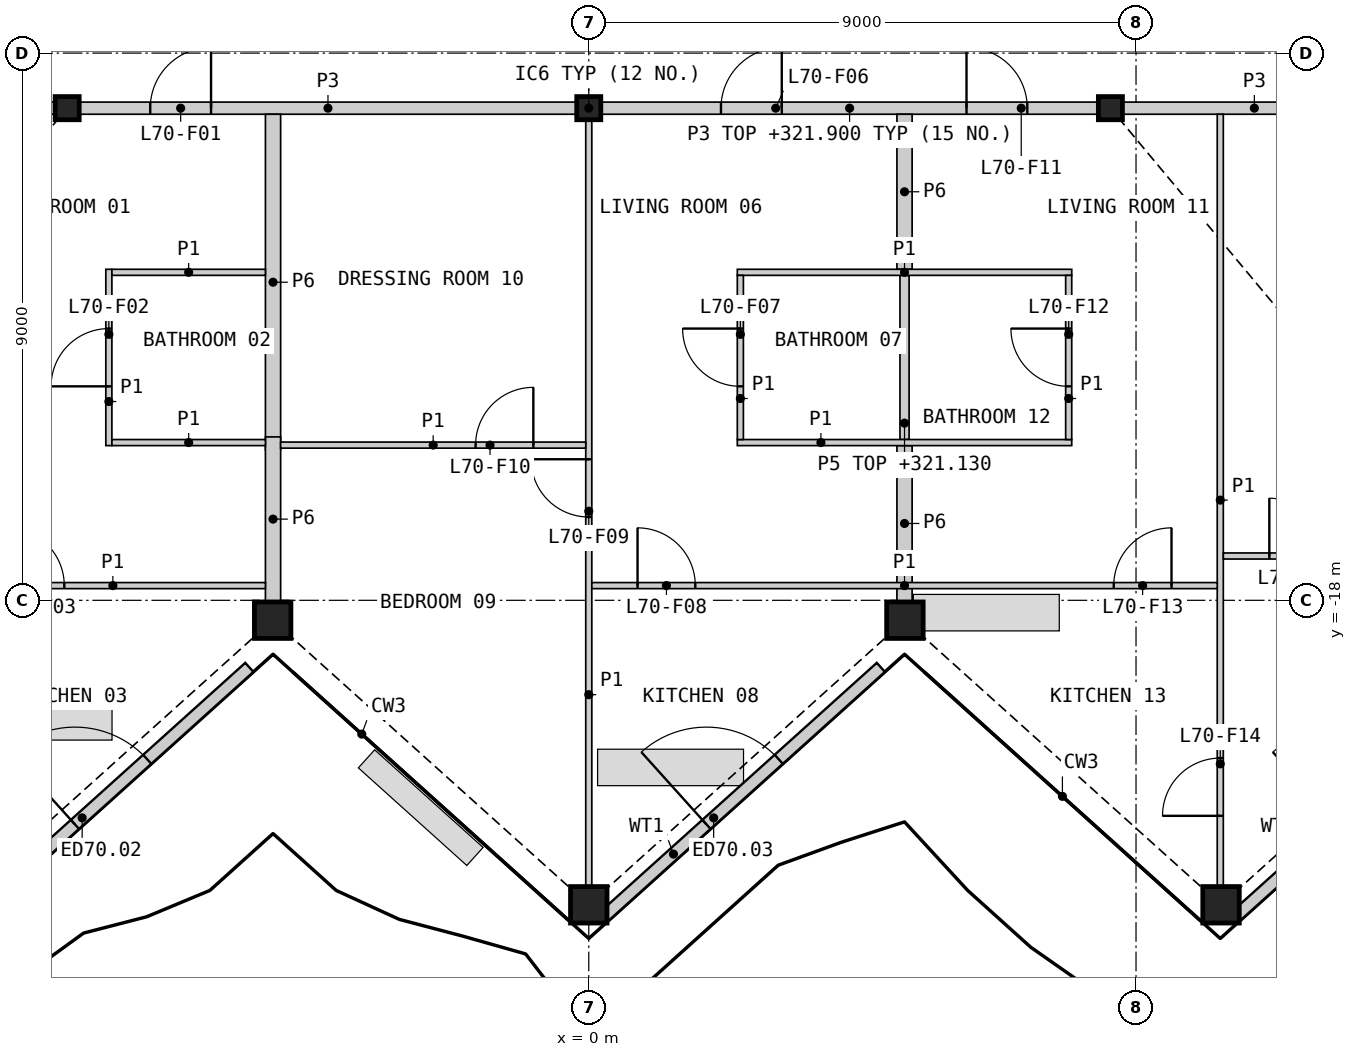
"""IFC4 building model, lengths in metres.
Left out: names, types, materials, properties, quantities, classifications, styles, units other than length and angle.
Written with IfcOpenShell. Run it as: python <this file> out.ifc"""

import sys

from ifc_helpers import new_model, si_unit, direction, frame, frame_2d, origin, origin_2d, place, context, subcontext, project, spatial, rectangle, hollow_rectangle, i_section, extrude, element, fill, save


model = new_model("IFC4")
c1 = context("Model", 3, precision=1e-05, world=origin(), true_north=direction((0.0, 1.0)))
c2 = subcontext(c1, "Body", "Model", "MODEL_VIEW")
j1 = project(units=[si_unit("LENGTHUNIT", "METRE"), si_unit("PLANEANGLEUNIT", "RADIAN")], contexts=[c1])
p1 = place(None, origin())
s1 = spatial("IfcSite", under=j1, at=p1, CompositionType="ELEMENT")
p2 = place(p1, origin())
s2 = spatial("IfcBuilding", under=s1, at=p2, CompositionType="ELEMENT")
p3 = place(p2, frame((0.0, 0.0, 318.8)))
s3 = spatial("IfcBuildingStorey", under=s2, at=p3, CompositionType="ELEMENT", Elevation=318.8)
for number, where, z_axis, x_axis in (
    (1, (-5.199, -18.327, 0.0), (0.0, 0.0, 1.0), (1.0, 0.0, 0.0)),
    (2, (0.0, -23.008, 0.0), (0.0, 0.0, 1.0), (1.0, 0.0, 0.0)),
    (3, (5.199, -18.327, 0.0), (0.0, 0.0, 1.0), (1.0, 0.0, 0.0)),
    (4, (10.398, -23.008, 0.0), (0.0, 0.0, 1.0), (1.0, 0.0, 0.0)),
):
    element("IfcColumn", number, at=place(p3, frame(where, z_axis=z_axis, x_axis=x_axis)), inside=s3, PredefinedType="COLUMN", context=c2, shape_type="SweptSolid", body=[
        extrude(hollow_rectangle(XDim=0.6, YDim=0.6, WallThickness=0.04, at=origin_2d()), origin(), (0.0, 0.0, 1.0), 3.4),
    ])
for number, where, z_axis, x_axis in (
    (5, (-8.578, -9.906, 0.0), (0.0, 0.0, 1.0), (1.0, 0.0, 0.0)),
    (6, (0.0, -9.906, 0.0), (0.0, 0.0, 1.0), (1.0, 0.0, 0.0)),
    (7, (8.578, -9.906, 0.0), (0.0, 0.0, 1.0), (1.0, 0.0, 0.0)),
):
    element("IfcColumn", number, at=place(p3, frame(where, z_axis=z_axis, x_axis=x_axis)), inside=s3, PredefinedType="COLUMN", context=c2, shape_type="SweptSolid", body=[
        extrude(i_section(OverallWidth=0.396, OverallDepth=0.381, WebThickness=0.019, FlangeThickness=0.03, at=origin_2d()), origin(), (0.0, 0.0, 1.0), 3.4),
    ])
p4 = place(p3, frame((-10.13, -23.198, 0.0), z_axis=(0.0, 0.0, 1.0), x_axis=(0.743139400616, 0.669136631229, 0.0)))
e8 = element("IfcWall", 8, at=p4, inside=s3, PredefinedType="SOLIDWALL", context=c2, shape_type="SweptSolid", body=[
    extrude(rectangle(XDim=6.12, YDim=0.2, at=frame_2d((3.06, 0.0))), origin(), (0.0, 0.0, 1.0), 2.488),
])
p5 = place(p4, frame((2.26, 0.0, 0.0)))
e9 = element("IfcOpeningElement", 9, at=p5, cuts=e8, PredefinedType="OPENING", context=c2, shape_type="SweptSolid", body=[
    extrude(rectangle(XDim=1.6, YDim=2.25, at=frame_2d((0.8, 1.125))), frame((0.0, 0.11, 0.0), z_axis=(0.0, -1.0, 0.0), x_axis=(1.0, 0.0, 0.0)), (0.0, 0.0, 1.0), 0.22),
])
p6 = place(p3, frame((0.256, -23.198, 0.0), z_axis=(0.0, 0.0, 1.0), x_axis=(0.743139400616, 0.669136631229, 0.0)))
e10 = element("IfcWall", 10, at=p6, inside=s3, PredefinedType="SOLIDWALL", context=c2, shape_type="SweptSolid", body=[
    extrude(rectangle(XDim=6.12, YDim=0.2, at=frame_2d((3.06, 0.0))), origin(), (0.0, 0.0, 1.0), 2.488),
])
p7 = place(p6, frame((2.26, 0.0, 0.0)))
e11 = element("IfcOpeningElement", 11, at=p7, cuts=e10, PredefinedType="OPENING", context=c2, shape_type="SweptSolid", body=[
    extrude(rectangle(XDim=1.6, YDim=2.25, at=frame_2d((0.8, 1.125))), frame((0.0, 0.11, 0.0), z_axis=(0.0, -1.0, 0.0), x_axis=(1.0, 0.0, 0.0)), (0.0, 0.0, 1.0), 0.22),
])
p8 = place(p3, frame((10.641, -23.198, 0.0), z_axis=(0.0, 0.0, 1.0), x_axis=(0.743121537674, 0.66915646918, 0.0)))
e12 = element("IfcWall", 12, at=p8, inside=s3, PredefinedType="SOLIDWALL", context=c2, shape_type="SweptSolid", body=[
    extrude(rectangle(XDim=6.12, YDim=0.2, at=frame_2d((3.06, 0.0))), origin(), (0.0, 0.0, 1.0), 2.488),
])
p9 = place(p8, frame((2.26, 0.0, 0.0)))
e13 = element("IfcOpeningElement", 13, at=p9, cuts=e12, PredefinedType="OPENING", context=c2, shape_type="SweptSolid", body=[
    extrude(rectangle(XDim=1.6, YDim=2.25, at=frame_2d((0.8, 1.125))), frame((0.0, 0.11, 0.0), z_axis=(0.0, -1.0, 0.0), x_axis=(1.0, 0.0, 0.0)), (0.0, 0.0, 1.0), 0.22),
])
p10 = place(p3, frame((0.208, -9.906, 0.0), z_axis=(0.0, 0.0, 1.0), x_axis=(1.0, 0.0, 0.0)))
e14 = element("IfcWall", 14, at=p10, inside=s3, PredefinedType="PARTITIONING", context=c2, shape_type="SweptSolid", body=[
    extrude(rectangle(XDim=8.163, YDim=0.2, at=frame_2d((4.082, 0.0))), origin(), (0.0, 0.0, 1.0), 3.1),
])
p11 = place(p10, frame((1.966, 0.0, 0.0)))
e15 = element("IfcOpeningElement", 15, at=p11, cuts=e14, PredefinedType="OPENING", context=c2, shape_type="SweptSolid", body=[
    extrude(rectangle(XDim=1.0, YDim=2.1, at=frame_2d((0.5, 1.05))), frame((0.0, 0.11, 0.0), z_axis=(0.0, -1.0, 0.0), x_axis=(1.0, 0.0, 0.0)), (0.0, 0.0, 1.0), 0.22),
])
p12 = place(p10, frame((6.004, 0.0, 0.0)))
e16 = element("IfcOpeningElement", 16, at=p12, cuts=e14, PredefinedType="OPENING", context=c2, shape_type="SweptSolid", body=[
    extrude(rectangle(XDim=1.0, YDim=2.1, at=frame_2d((0.5, 1.05))), frame((0.0, 0.11, 0.0), z_axis=(0.0, -1.0, 0.0), x_axis=(1.0, 0.0, 0.0)), (0.0, 0.0, 1.0), 0.22),
])
p13 = place(p3, frame((-8.371, -9.906, 0.0), z_axis=(0.0, 0.0, 1.0), x_axis=(1.0, 0.0, 0.0)))
e17 = element("IfcWall", 17, at=p13, inside=s3, PredefinedType="PARTITIONING", context=c2, shape_type="SweptSolid", body=[
    extrude(rectangle(XDim=8.163, YDim=0.2, at=frame_2d((4.082, 0.0))), origin(), (0.0, 0.0, 1.0), 3.1),
])
p14 = place(p13, frame((1.159, 0.0, 0.0)))
e18 = element("IfcOpeningElement", 18, at=p14, cuts=e17, PredefinedType="OPENING", context=c2, shape_type="SweptSolid", body=[
    extrude(rectangle(XDim=1.0, YDim=2.1, at=frame_2d((0.5, 1.05))), frame((0.0, 0.11, 0.0), z_axis=(0.0, -1.0, 0.0), x_axis=(1.0, 0.0, 0.0)), (0.0, 0.0, 1.0), 0.22),
])
p15 = place(p3, frame((-5.193, -15.531, 0.0), z_axis=(0.0, 0.0, 1.0), x_axis=(0.0, 1.0, 0.0)))
e19 = element("IfcWall", 19, at=p15, inside=s3, PredefinedType="PARTITIONING", context=c2, shape_type="SweptSolid", body=[
    extrude(rectangle(XDim=5.525, YDim=0.25, at=frame_2d((2.762, 0.0))), origin(), (0.0, 0.0, 1.0), 2.33),
])
for number, where, z_axis, x_axis in (
    (20, (-13.106, -9.906, 0.0), (0.0, 0.0, 1.0), (1.0, 0.0, 0.0)),
    (21, (8.786, -9.906, 0.0), (0.0, 0.0, 1.0), (1.0, 0.0, 0.0)),
):
    element("IfcWall", number, at=place(p3, frame(where, z_axis=z_axis, x_axis=x_axis)), inside=s3, PredefinedType="PARTITIONING", context=c2, shape_type="SweptSolid", body=[
        extrude(rectangle(XDim=4.32, YDim=0.2, at=frame_2d((2.16, 0.0))), origin(), (0.0, 0.0, 1.0), 3.1),
    ])
p16 = place(p3, frame((5.193, -12.556, 0.0), z_axis=(0.0, 0.0, 1.0), x_axis=(0.0, 1.0, 0.0)))
e22 = element("IfcWall", 22, at=p16, inside=s3, PredefinedType="PARTITIONING", context=c2, shape_type="SweptSolid", body=[
    extrude(rectangle(XDim=2.55, YDim=0.25, at=frame_2d((1.275, 0.0))), origin(), (0.0, 0.0, 1.0), 2.33),
])
p17 = place(p3, frame((5.193, -18.017, 0.0), z_axis=(0.0, 0.0, 1.0), x_axis=(0.0, 1.0, 0.0)))
e23 = element("IfcWall", 23, at=p17, inside=s3, PredefinedType="PARTITIONING", context=c2, shape_type="SweptSolid", body=[
    extrude(rectangle(XDim=2.561, YDim=0.25, at=frame_2d((1.281, 0.0))), origin(), (0.0, 0.0, 1.0), 2.33),
])
p18 = place(p3, frame((-5.193, -18.017, 0.0), z_axis=(0.0, 0.0, 1.0), x_axis=(0.0, 1.0, 0.0)))
e24 = element("IfcWall", 24, at=p18, inside=s3, PredefinedType="PARTITIONING", context=c2, shape_type="SweptSolid", body=[
    extrude(rectangle(XDim=2.705, YDim=0.25, at=frame_2d((1.352, 0.0))), origin(), (0.0, 0.0, 1.0), 2.33),
])
p19 = place(p3, frame((5.193, -15.356, 0.0), z_axis=(0.0, 0.0, 1.0), x_axis=(0.0, 1.0, 0.0)))
e25 = element("IfcWall", 25, at=p19, inside=s3, PredefinedType="PLUMBINGWALL", context=c2, shape_type="SweptSolid", body=[
    extrude(rectangle(XDim=2.7, YDim=0.15, at=frame_2d((1.35, 0.0))), origin(), (0.0, 0.0, 1.0), 2.33),
])
p20 = place(p3, frame((10.385, -22.698, 0.0), z_axis=(0.0, 0.0, 1.0), x_axis=(0.0, 1.0, 0.0)))
e26 = element("IfcWall", 26, at=p20, inside=s3, PredefinedType="PARTITIONING", context=c2, shape_type="SweptSolid", body=[
    extrude(rectangle(XDim=12.692, YDim=0.1, at=frame_2d((6.346, 0.0))), origin(), (0.0, 0.0, 1.0), 2.33),
])
p21 = place(p20, frame((1.153, 0.0, 0.0)))
e27 = element("IfcOpeningElement", 27, at=p21, cuts=e26, PredefinedType="OPENING", context=c2, shape_type="SweptSolid", body=[
    extrude(rectangle(XDim=0.95, YDim=2.1, at=frame_2d((0.475, 1.05))), frame((0.0, 0.06, 0.0), z_axis=(0.0, -1.0, 0.0), x_axis=(1.0, 0.0, 0.0)), (0.0, 0.0, 1.0), 0.12),
])
p22 = place(p3, frame((0.0, -22.698, 0.0), z_axis=(0.0, 0.0, 1.0), x_axis=(0.0, 1.0, 0.0)))
e28 = element("IfcWall", 28, at=p22, inside=s3, PredefinedType="PARTITIONING", context=c2, shape_type="SweptSolid", body=[
    extrude(rectangle(XDim=12.585, YDim=0.1, at=frame_2d((6.292, 0.0))), origin(), (0.0, 0.0, 1.0), 2.33),
])
p23 = place(p22, frame((6.068, 0.0, 0.0)))
e29 = element("IfcOpeningElement", 29, at=p23, cuts=e28, PredefinedType="OPENING", context=c2, shape_type="SweptSolid", body=[
    extrude(rectangle(XDim=0.95, YDim=2.1, at=frame_2d((0.475, 1.05))), frame((0.0, 0.06, 0.0), z_axis=(0.0, -1.0, 0.0), x_axis=(1.0, 0.0, 0.0)), (0.0, 0.0, 1.0), 0.12),
])
p24 = place(p3, frame((0.05, -17.758, 0.0), z_axis=(0.0, 0.0, 1.0), x_axis=(1.0, 0.0, 0.0)))
e30 = element("IfcWall", 30, at=p24, inside=s3, PredefinedType="PARTITIONING", context=c2, shape_type="SweptSolid", body=[
    extrude(rectangle(XDim=10.286, YDim=0.1, at=frame_2d((5.143, 0.0))), origin(), (0.0, 0.0, 1.0), 2.33),
])
p25 = place(p24, frame((0.752, 0.0, 0.0)))
e31 = element("IfcOpeningElement", 31, at=p25, cuts=e30, PredefinedType="OPENING", context=c2, shape_type="SweptSolid", body=[
    extrude(rectangle(XDim=0.95, YDim=2.1, at=frame_2d((0.475, 1.05))), frame((0.0, 0.06, 0.0), z_axis=(0.0, -1.0, 0.0), x_axis=(1.0, 0.0, 0.0)), (0.0, 0.0, 1.0), 0.12),
])
p26 = place(p24, frame((8.584, 0.0, 0.0)))
e32 = element("IfcOpeningElement", 32, at=p26, cuts=e30, PredefinedType="OPENING", context=c2, shape_type="SweptSolid", body=[
    extrude(rectangle(XDim=0.95, YDim=2.1, at=frame_2d((0.475, 1.05))), frame((0.0, 0.06, 0.0), z_axis=(0.0, -1.0, 0.0), x_axis=(1.0, 0.0, 0.0)), (0.0, 0.0, 1.0), 0.12),
])
p27 = place(p3, frame((10.436, -17.271, 0.0), z_axis=(0.0, 0.0, 1.0), x_axis=(1.0, 0.0, 0.0)))
e33 = element("IfcWall", 33, at=p27, inside=s3, PredefinedType="PARTITIONING", context=c2, shape_type="SweptSolid", body=[
    extrude(rectangle(XDim=6.722, YDim=0.1, at=frame_2d((3.361, 0.0))), origin(), (0.0, 0.0, 1.0), 2.33),
])
p28 = place(p27, frame((0.757, 0.0, 0.0)))
e34 = element("IfcOpeningElement", 34, at=p28, cuts=e33, PredefinedType="OPENING", context=c2, shape_type="SweptSolid", body=[
    extrude(rectangle(XDim=0.95, YDim=2.1, at=frame_2d((0.475, 1.05))), frame((0.0, 0.06, 0.0), z_axis=(0.0, -1.0, 0.0), x_axis=(1.0, 0.0, 0.0)), (0.0, 0.0, 1.0), 0.12),
])
for number, where, z_axis, x_axis in (
    (35, (2.443, -12.606, 0.0), (0.0, 0.0, 1.0), (1.0, 0.0, 0.0)),
    (36, (2.443, -15.406, 0.0), (0.0, 0.0, 1.0), (1.0, 0.0, 0.0)),
):
    element("IfcWall", number, at=place(p3, frame(where, z_axis=z_axis, x_axis=x_axis)), inside=s3, PredefinedType="PARTITIONING", context=c2, shape_type="SweptSolid", body=[
        extrude(rectangle(XDim=5.5, YDim=0.1, at=frame_2d((2.75, 0.0))), origin(), (0.0, 0.0, 1.0), 2.33),
    ])
p29 = place(p3, frame((-10.336, -17.758, 0.0), z_axis=(0.0, 0.0, 1.0), x_axis=(1.0, 0.0, 0.0)))
e37 = element("IfcWall", 37, at=p29, inside=s3, PredefinedType="PARTITIONING", context=c2, shape_type="SweptSolid", body=[
    extrude(rectangle(XDim=5.018, YDim=0.1, at=frame_2d((2.509, 0.0))), origin(), (0.0, 0.0, 1.0), 2.33),
])
p30 = place(p29, frame((0.76, 0.0, 0.0)))
e38 = element("IfcOpeningElement", 38, at=p30, cuts=e37, PredefinedType="OPENING", context=c2, shape_type="SweptSolid", body=[
    extrude(rectangle(XDim=0.95, YDim=2.1, at=frame_2d((0.475, 1.05))), frame((0.0, 0.06, 0.0), z_axis=(0.0, -1.0, 0.0), x_axis=(1.0, 0.0, 0.0)), (0.0, 0.0, 1.0), 0.12),
])
p31 = place(p3, frame((-5.068, -15.447, 0.0), z_axis=(0.0, 0.0, 1.0), x_axis=(1.0, 0.0, 0.0)))
e39 = element("IfcWall", 39, at=p31, inside=s3, PredefinedType="PARTITIONING", context=c2, shape_type="SweptSolid", body=[
    extrude(rectangle(XDim=5.018, YDim=0.1, at=frame_2d((2.509, 0.0))), origin(), (0.0, 0.0, 1.0), 2.33),
])
p32 = place(p31, frame((3.206, 0.0, 0.0)))
e40 = element("IfcOpeningElement", 40, at=p32, cuts=e39, PredefinedType="OPENING", context=c2, shape_type="SweptSolid", body=[
    extrude(rectangle(XDim=0.95, YDim=2.1, at=frame_2d((0.475, 1.05))), frame((0.0, 0.06, 0.0), z_axis=(0.0, -1.0, 0.0), x_axis=(1.0, 0.0, 0.0)), (0.0, 0.0, 1.0), 0.12),
])
p33 = place(p3, frame((-7.893, -15.456, 0.0), z_axis=(0.0, 0.0, 1.0), x_axis=(0.0, 1.0, 0.0)))
e41 = element("IfcWall", 41, at=p33, inside=s3, PredefinedType="PARTITIONING", context=c2, shape_type="SweptSolid", body=[
    extrude(rectangle(XDim=2.9, YDim=0.1, at=frame_2d((1.45, 0.0))), origin(), (0.0, 0.0, 1.0), 2.33),
])
p34 = place(p33, frame((0.975, 0.0, 0.0)))
e42 = element("IfcOpeningElement", 42, at=p34, cuts=e41, PredefinedType="OPENING", context=c2, shape_type="SweptSolid", body=[
    extrude(rectangle(XDim=0.95, YDim=2.1, at=frame_2d((0.475, 1.05))), frame((0.0, 0.06, 0.0), z_axis=(0.0, -1.0, 0.0), x_axis=(1.0, 0.0, 0.0)), (0.0, 0.0, 1.0), 0.12),
])
p35 = place(p3, frame((2.493, -15.356, 0.0), z_axis=(0.0, 0.0, 1.0), x_axis=(0.0, 1.0, 0.0)))
e43 = element("IfcWall", 43, at=p35, inside=s3, PredefinedType="PARTITIONING", context=c2, shape_type="SweptSolid", body=[
    extrude(rectangle(XDim=2.7, YDim=0.1, at=frame_2d((1.35, 0.0))), origin(), (0.0, 0.0, 1.0), 2.33),
])
p36 = place(p35, frame((0.875, 0.0, 0.0)))
e44 = element("IfcOpeningElement", 44, at=p36, cuts=e43, PredefinedType="OPENING", context=c2, shape_type="SweptSolid", body=[
    extrude(rectangle(XDim=0.95, YDim=2.1, at=frame_2d((0.475, 1.05))), frame((0.0, 0.06, 0.0), z_axis=(0.0, -1.0, 0.0), x_axis=(1.0, 0.0, 0.0)), (0.0, 0.0, 1.0), 0.12),
])
p37 = place(p3, frame((7.893, -15.356, 0.0), z_axis=(0.0, 0.0, 1.0), x_axis=(0.0, 1.0, 0.0)))
e45 = element("IfcWall", 45, at=p37, inside=s3, PredefinedType="PARTITIONING", context=c2, shape_type="SweptSolid", body=[
    extrude(rectangle(XDim=2.7, YDim=0.1, at=frame_2d((1.35, 0.0))), origin(), (0.0, 0.0, 1.0), 2.33),
])
p38 = place(p37, frame((0.875, 0.0, 0.0)))
e46 = element("IfcOpeningElement", 46, at=p38, cuts=e45, PredefinedType="OPENING", context=c2, shape_type="SweptSolid", body=[
    extrude(rectangle(XDim=0.95, YDim=2.1, at=frame_2d((0.475, 1.05))), frame((0.0, 0.06, 0.0), z_axis=(0.0, -1.0, 0.0), x_axis=(1.0, 0.0, 0.0)), (0.0, 0.0, 1.0), 0.12),
])
for number, where, z_axis, x_axis in (
    (47, (-7.843, -12.606, 0.0), (0.0, 0.0, 1.0), (1.0, 0.0, 0.0)),
    (48, (-7.843, -15.406, 0.0), (0.0, 0.0, 1.0), (1.0, 0.0, 0.0)),
):
    element("IfcWall", number, at=place(p3, frame(where, z_axis=z_axis, x_axis=x_axis)), inside=s3, PredefinedType="PARTITIONING", context=c2, shape_type="SweptSolid", body=[
        extrude(rectangle(XDim=2.525, YDim=0.1, at=frame_2d((1.262, 0.0))), origin(), (0.0, 0.0, 1.0), 2.33),
    ])
p39 = place(p5, origin())
e49 = element("IfcDoor", 49, at=p39, inside=s3, OperationType="DOUBLE_DOOR_SINGLE_SWING", PredefinedType="DOOR", context=c2, shape_type="SweptSolid", body=[
    extrude(rectangle(XDim=1.6, YDim=2.25, at=frame_2d((0.8, 1.125))), frame((0.0, 0.025, 0.0), z_axis=(0.0, -1.0, 0.0), x_axis=(1.0, 0.0, 0.0)), (0.0, 0.0, 1.0), 0.05),
])
fill(e9, e49)
p40 = place(p7, origin())
e50 = element("IfcDoor", 50, at=p40, inside=s3, OperationType="DOUBLE_DOOR_SINGLE_SWING", PredefinedType="DOOR", context=c2, shape_type="SweptSolid", body=[
    extrude(rectangle(XDim=1.6, YDim=2.25, at=frame_2d((0.8, 1.125))), frame((0.0, 0.025, 0.0), z_axis=(0.0, -1.0, 0.0), x_axis=(1.0, 0.0, 0.0)), (0.0, 0.0, 1.0), 0.05),
])
fill(e11, e50)
p41 = place(p14, origin())
e51 = element("IfcDoor", 51, at=p41, inside=s3, OperationType="SINGLE_SWING_RIGHT", PredefinedType="DOOR", context=c2, shape_type="SweptSolid", body=[
    extrude(rectangle(XDim=1.0, YDim=2.1, at=frame_2d((0.5, 1.05))), frame((0.0, 0.025, 0.0), z_axis=(0.0, -1.0, 0.0), x_axis=(1.0, 0.0, 0.0)), (0.0, 0.0, 1.0), 0.05),
])
fill(e18, e51)
p42 = place(p34, origin())
e52 = element("IfcDoor", 52, at=p42, inside=s3, OperationType="SINGLE_SWING_LEFT", PredefinedType="DOOR", context=c2, shape_type="SweptSolid", body=[
    extrude(rectangle(XDim=0.95, YDim=2.1, at=frame_2d((0.475, 1.05))), frame((0.0, 0.025, 0.0), z_axis=(0.0, -1.0, 0.0), x_axis=(1.0, 0.0, 0.0)), (0.0, 0.0, 1.0), 0.05),
])
fill(e42, e52)
p43 = place(p30, origin())
e53 = element("IfcDoor", 53, at=p43, inside=s3, OperationType="SINGLE_SWING_LEFT", PredefinedType="DOOR", context=c2, shape_type="SweptSolid", body=[
    extrude(rectangle(XDim=0.95, YDim=2.1, at=frame_2d((0.475, 1.05))), frame((0.0, 0.025, 0.0), z_axis=(0.0, -1.0, 0.0), x_axis=(1.0, 0.0, 0.0)), (0.0, 0.0, 1.0), 0.05),
])
fill(e38, e53)
p44 = place(p11, origin())
e54 = element("IfcDoor", 54, at=p44, inside=s3, OperationType="SINGLE_SWING_RIGHT", PredefinedType="DOOR", context=c2, shape_type="SweptSolid", body=[
    extrude(rectangle(XDim=1.0, YDim=2.1, at=frame_2d((0.5, 1.05))), frame((0.0, 0.025, 0.0), z_axis=(0.0, -1.0, 0.0), x_axis=(1.0, 0.0, 0.0)), (0.0, 0.0, 1.0), 0.05),
])
fill(e15, e54)
p45 = place(p36, origin())
e55 = element("IfcDoor", 55, at=p45, inside=s3, OperationType="SINGLE_SWING_RIGHT", PredefinedType="DOOR", context=c2, shape_type="SweptSolid", body=[
    extrude(rectangle(XDim=0.95, YDim=2.1, at=frame_2d((0.475, 1.05))), frame((0.0, 0.025, 0.0), z_axis=(0.0, -1.0, 0.0), x_axis=(1.0, 0.0, 0.0)), (0.0, 0.0, 1.0), 0.05),
])
fill(e44, e55)
p46 = place(p25, origin())
e56 = element("IfcDoor", 56, at=p46, inside=s3, OperationType="SINGLE_SWING_LEFT", PredefinedType="DOOR", context=c2, shape_type="SweptSolid", body=[
    extrude(rectangle(XDim=0.95, YDim=2.1, at=frame_2d((0.475, 1.05))), frame((0.0, 0.025, 0.0), z_axis=(0.0, -1.0, 0.0), x_axis=(1.0, 0.0, 0.0)), (0.0, 0.0, 1.0), 0.05),
])
fill(e31, e56)
p47 = place(p23, origin())
e57 = element("IfcDoor", 57, at=p47, inside=s3, OperationType="SINGLE_SWING_RIGHT", PredefinedType="DOOR", context=c2, shape_type="SweptSolid", body=[
    extrude(rectangle(XDim=0.95, YDim=2.1, at=frame_2d((0.475, 1.05))), frame((0.0, 0.025, 0.0), z_axis=(0.0, -1.0, 0.0), x_axis=(1.0, 0.0, 0.0)), (0.0, 0.0, 1.0), 0.05),
])
fill(e29, e57)
p48 = place(p32, origin())
e58 = element("IfcDoor", 58, at=p48, inside=s3, OperationType="SINGLE_SWING_RIGHT", PredefinedType="DOOR", context=c2, shape_type="SweptSolid", body=[
    extrude(rectangle(XDim=0.95, YDim=2.1, at=frame_2d((0.475, 1.05))), frame((0.0, 0.025, 0.0), z_axis=(0.0, -1.0, 0.0), x_axis=(1.0, 0.0, 0.0)), (0.0, 0.0, 1.0), 0.05),
])
fill(e40, e58)
p49 = place(p12, origin())
e59 = element("IfcDoor", 59, at=p49, inside=s3, OperationType="SINGLE_SWING_LEFT", PredefinedType="DOOR", context=c2, shape_type="SweptSolid", body=[
    extrude(rectangle(XDim=1.0, YDim=2.1, at=frame_2d((0.5, 1.05))), frame((0.0, 0.025, 0.0), z_axis=(0.0, -1.0, 0.0), x_axis=(1.0, 0.0, 0.0)), (0.0, 0.0, 1.0), 0.05),
])
fill(e16, e59)
p50 = place(p38, origin())
e60 = element("IfcDoor", 60, at=p50, inside=s3, OperationType="SINGLE_SWING_RIGHT", PredefinedType="DOOR", context=c2, shape_type="SweptSolid", body=[
    extrude(rectangle(XDim=0.95, YDim=2.1, at=frame_2d((0.475, 1.05))), frame((0.0, 0.025, 0.0), z_axis=(0.0, -1.0, 0.0), x_axis=(1.0, 0.0, 0.0)), (0.0, 0.0, 1.0), 0.05),
])
fill(e46, e60)
p51 = place(p26, origin())
e61 = element("IfcDoor", 61, at=p51, inside=s3, OperationType="SINGLE_SWING_RIGHT", PredefinedType="DOOR", context=c2, shape_type="SweptSolid", body=[
    extrude(rectangle(XDim=0.95, YDim=2.1, at=frame_2d((0.475, 1.05))), frame((0.0, 0.025, 0.0), z_axis=(0.0, -1.0, 0.0), x_axis=(1.0, 0.0, 0.0)), (0.0, 0.0, 1.0), 0.05),
])
fill(e32, e61)
p52 = place(p21, origin())
e62 = element("IfcDoor", 62, at=p52, inside=s3, OperationType="SINGLE_SWING_LEFT", PredefinedType="DOOR", context=c2, shape_type="SweptSolid", body=[
    extrude(rectangle(XDim=0.95, YDim=2.1, at=frame_2d((0.475, 1.05))), frame((0.0, 0.025, 0.0), z_axis=(0.0, -1.0, 0.0), x_axis=(1.0, 0.0, 0.0)), (0.0, 0.0, 1.0), 0.05),
])
fill(e27, e62)
p53 = place(p28, origin())
e63 = element("IfcDoor", 63, at=p53, inside=s3, OperationType="SINGLE_SWING_LEFT", PredefinedType="DOOR", context=c2, shape_type="SweptSolid", body=[
    extrude(rectangle(XDim=0.95, YDim=2.1, at=frame_2d((0.475, 1.05))), frame((0.0, 0.025, 0.0), z_axis=(0.0, -1.0, 0.0), x_axis=(1.0, 0.0, 0.0)), (0.0, 0.0, 1.0), 0.05),
])
fill(e34, e63)
save(model, sys.argv[1])
